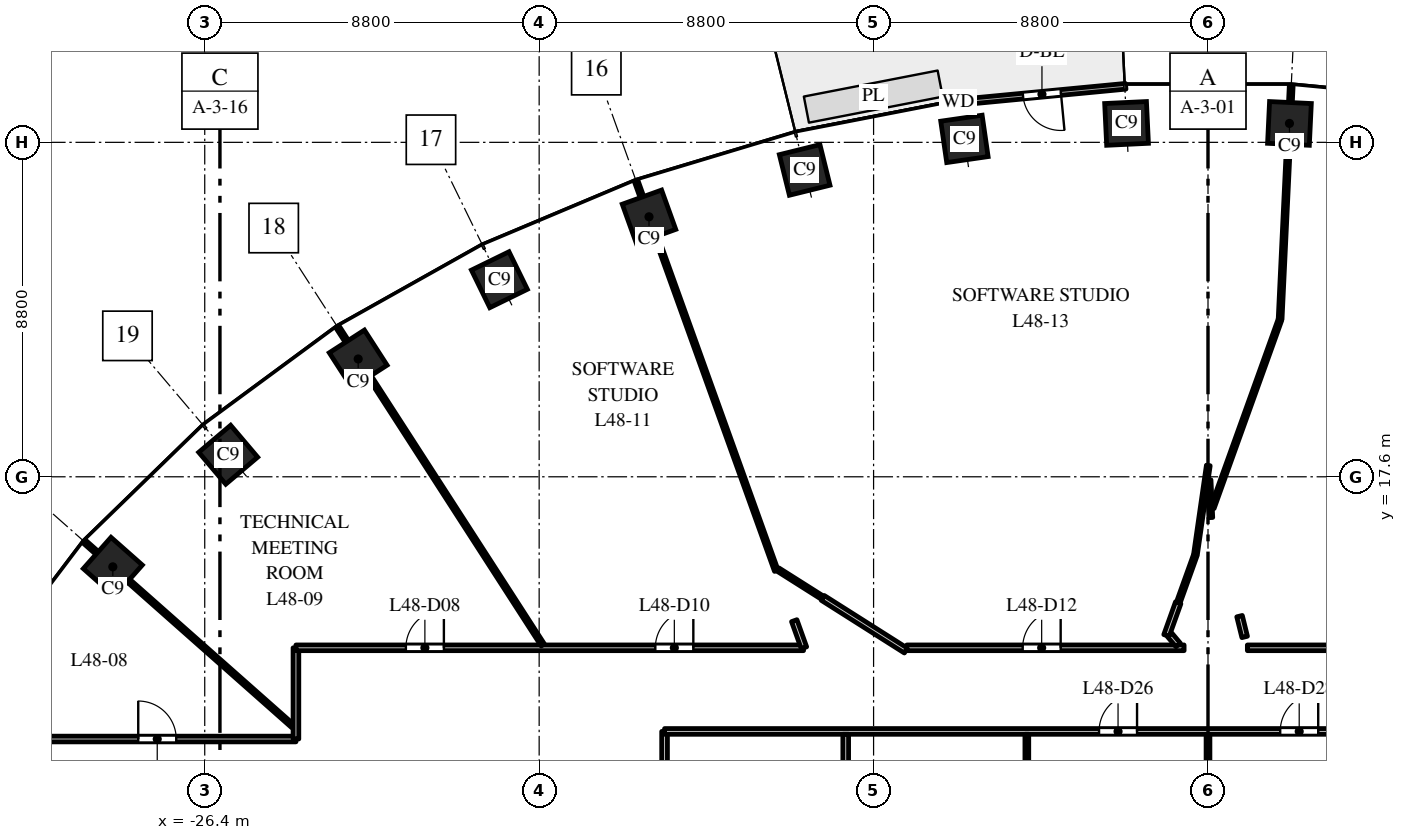
"""IFC4 building model, lengths in metres.
Left out: names, types, materials, properties, quantities, classifications, styles, units other than length and angle.
Written with IfcOpenShell. Run it as: python <this file> out.ifc"""

import sys

from ifc_helpers import new_model, si_unit, direction, frame, frame_2d, origin, origin_2d, place, context, subcontext, project, spatial, rectangle, extrude, element, fill, save


model = new_model("IFC4")
c1 = context("Model", 3, precision=1e-05, world=origin(), true_north=direction((0.0, 1.0)))
c2 = subcontext(c1, "Body", "Model", "MODEL_VIEW")
j1 = project(units=[si_unit("LENGTHUNIT", "METRE"), si_unit("PLANEANGLEUNIT", "RADIAN")], contexts=[c1])
p1 = place(None, origin())
s1 = spatial("IfcSite", under=j1, at=p1, CompositionType="ELEMENT")
p2 = place(p1, origin())
s2 = spatial("IfcBuilding", under=s1, at=p2, CompositionType="ELEMENT")
p3 = place(p2, frame((0.0, 0.0, 233.5)))
s3 = spatial("IfcBuildingStorey", under=s2, at=p3, CompositionType="ELEMENT", Elevation=233.5)
for number, where, z_axis, x_axis in (
    (1, (2.143, 26.898, 0.0), (0.0, 0.0, 1.0), (-0.999, 0.048, 0.0)),
    (2, (-2.143, 26.898, 0.0), (0.0, 0.0, 1.0), (-0.999, -0.048, 0.0)),
    (3, (-6.409, 26.491, 0.0), (0.0, 0.0, 1.0), (-0.99, -0.143, 0.0)),
    (4, (-10.613, 25.674, 0.0), (0.0, 0.0, 1.0), (-0.971, -0.24, 0.0)),
    (5, (-14.709, 24.441, 0.0), (0.0, 0.0, 1.0), (-0.941, -0.338, 0.0)),
    (6, (-18.646, 22.785, 0.0), (0.0, 0.0, 1.0), (-0.898, -0.439, 0.0)),
    (7, (-22.362, 20.7, 0.0), (0.0, 0.0, 1.0), (-0.84, -0.542, 0.0)),
    (8, (-25.783, 18.18, 0.0), (0.0, 0.0, 1.0), (-0.763, -0.646, 0.0)),
    (9, (-28.819, 15.23, 0.0), (0.0, 0.0, 1.0), (-0.663, -0.749, 0.0)),
):
    element("IfcColumn", number, at=place(p3, frame(where, z_axis=z_axis, x_axis=x_axis)), inside=s3, PredefinedType="COLUMN", context=c2, shape_type="SweptSolid", body=[
        extrude(rectangle(XDim=1.1, YDim=1.1, at=origin_2d()), origin(), (0.0, 0.0, 1.0), 4.0),
    ])
p4 = place(p3, frame((-2.166, 27.875, 0.0), z_axis=(0.0, 0.0, 1.0), x_axis=(-0.995473879823, -0.095035543824, 0.0)))
e10 = element("IfcWall", 10, at=p4, inside=s3, PredefinedType="STANDARD", context=c2, shape_type="SweptSolid", body=[
    extrude(rectangle(XDim=4.426, YDim=0.15, at=frame_2d((2.213, 0.0))), origin(), (0.0, 0.0, 1.0), 3.7),
])
p5 = place(p4, frame((1.713, 0.0, 0.0)))
e11 = element("IfcOpeningElement", 11, at=p5, cuts=e10, PredefinedType="OPENING", context=c2, shape_type="SweptSolid", body=[
    extrude(rectangle(XDim=1.0, YDim=2.4, at=frame_2d((0.5, 1.2))), frame((0.0, 0.085, 0.0), z_axis=(0.0, -1.0, 0.0), x_axis=(1.0, 0.0, 0.0)), (0.0, 0.0, 1.0), 0.17),
])
p6 = place(p3, frame((-31.5, 10.7, 0.0), z_axis=(0.0, 0.0, 1.0), x_axis=(1.0, 0.0, 0.0)))
e12 = element("IfcWall", 12, at=p6, inside=s3, PredefinedType="PARTITIONING", context=c2, shape_type="SweptSolid", body=[
    extrude(rectangle(XDim=7.5, YDim=0.15, at=frame_2d((3.75, 0.0))), origin(), (0.0, 0.0, 1.0), 3.1),
])
p7 = place(p6, frame((3.35, 0.0, 0.0)))
e13 = element("IfcOpeningElement", 13, at=p7, cuts=e12, PredefinedType="OPENING", context=c2, shape_type="SweptSolid", body=[
    extrude(rectangle(XDim=1.0, YDim=2.1, at=frame_2d((0.5, 1.05))), frame((0.0, 0.085, 0.0), z_axis=(0.0, -1.0, 0.0), x_axis=(1.0, 0.0, 0.0)), (0.0, 0.0, 1.0), 0.17),
])
p8 = place(p3, frame((-29.569, 15.895, 0.0), z_axis=(0.0, 0.0, 1.0), x_axis=(0.748936848479, -0.662641378869, 0.0)))
e14 = element("IfcWall", 14, at=p8, inside=s3, PredefinedType="PARTITIONING", context=c2, shape_type="SweptSolid", body=[
    extrude(rectangle(XDim=7.336, YDim=0.1, at=frame_2d((3.668, 0.0))), origin(), (0.0, 0.0, 1.0), 3.0),
])
p9 = place(p3, frame((-24.0, 10.7, 0.0), z_axis=(0.0, 0.0, 1.0), x_axis=(0.0, 1.0, 0.0)))
e15 = element("IfcWall", 15, at=p9, inside=s3, PredefinedType="PARTITIONING", context=c2, shape_type="SweptSolid", body=[
    extrude(rectangle(XDim=2.4, YDim=0.15, at=frame_2d((1.2, 0.0))), origin(), (0.0, 0.0, 1.0), 3.7),
])
p10 = place(p3, frame((-24.0, 13.1, 0.0), z_axis=(0.0, 0.0, 1.0), x_axis=(1.0, 0.0, 0.0)))
e16 = element("IfcWall", 16, at=p10, inside=s3, PredefinedType="PARTITIONING", context=c2, shape_type="SweptSolid", body=[
    extrude(rectangle(XDim=13.357, YDim=0.15, at=frame_2d((6.678, 0.0))), origin(), (0.0, 0.0, 1.0), 2.75),
])
p11 = place(p10, frame((2.893, 0.0, 0.0)))
e17 = element("IfcOpeningElement", 17, at=p11, cuts=e16, PredefinedType="OPENING", context=c2, shape_type="SweptSolid", body=[
    extrude(rectangle(XDim=1.0, YDim=2.1, at=frame_2d((0.5, 1.05))), frame((0.0, 0.085, 0.0), z_axis=(0.0, -1.0, 0.0), x_axis=(1.0, 0.0, 0.0)), (0.0, 0.0, 1.0), 0.17),
])
p12 = place(p10, frame((9.457, 0.0, 0.0)))
e18 = element("IfcOpeningElement", 18, at=p12, cuts=e16, PredefinedType="OPENING", context=c2, shape_type="SweptSolid", body=[
    extrude(rectangle(XDim=1.0, YDim=2.1, at=frame_2d((0.5, 1.05))), frame((0.0, 0.085, 0.0), z_axis=(0.0, -1.0, 0.0), x_axis=(1.0, 0.0, 0.0)), (0.0, 0.0, 1.0), 0.17),
])
p13 = place(p3, frame((-22.905, 21.542, 0.0), z_axis=(0.0, 0.0, 1.0), x_axis=(0.542277075573, -0.840199722273, 0.0)))
e19 = element("IfcWall", 19, at=p13, inside=s3, PredefinedType="PARTITIONING", context=c2, shape_type="SweptSolid", body=[
    extrude(rectangle(XDim=9.958, YDim=0.1, at=frame_2d((4.979, 0.0))), origin(), (0.0, 0.0, 1.0), 3.0),
])
p14 = place(p3, frame((-15.048, 25.383, 0.0), z_axis=(0.0, 0.0, 1.0), x_axis=(0.338406105684, -0.941000163462, 0.0)))
e20 = element("IfcWall", 20, at=p14, inside=s3, PredefinedType="PARTITIONING", context=c2, shape_type="SweptSolid", body=[
    extrude(rectangle(XDim=10.898, YDim=0.1, at=frame_2d((5.449, 0.0))), origin(), (0.0, 0.0, 1.0), 3.0),
])
p15 = place(p3, frame((-14.3, -10.9, 0.0), z_axis=(0.0, 0.0, 1.0), x_axis=(0.0, 1.0, 0.0)))
e21 = element("IfcWall", 21, at=p15, inside=s3, PredefinedType="PARTITIONING", context=c2, shape_type="SweptSolid", body=[
    extrude(rectangle(XDim=21.8, YDim=0.15, at=frame_2d((10.9, 0.0))), origin(), (0.0, 0.0, 1.0), 2.75),
])
p16 = place(p15, frame((10.4, 0.0, 0.0)))
e22 = element("IfcOpeningElement", 22, at=p16, cuts=e21, PredefinedType="OPENING", context=c2, shape_type="SweptSolid", body=[
    extrude(rectangle(XDim=1.0, YDim=2.1, at=frame_2d((0.5, 1.05))), frame((0.0, 0.085, 0.0), z_axis=(0.0, -1.0, 0.0), x_axis=(1.0, 0.0, 0.0)), (0.0, 0.0, 1.0), 0.17),
])
p17 = place(p3, frame((-14.3, 10.9, 0.0), z_axis=(0.0, 0.0, 1.0), x_axis=(1.0, 0.0, 0.0)))
e23 = element("IfcWall", 23, at=p17, inside=s3, PredefinedType="PARTITIONING", context=c2, shape_type="SweptSolid", body=[
    extrude(rectangle(XDim=28.6, YDim=0.15, at=frame_2d((14.3, 0.0))), origin(), (0.0, 0.0, 1.0), 2.85),
])
p18 = place(p17, frame((11.433, 0.0, 0.0)))
e24 = element("IfcOpeningElement", 24, at=p18, cuts=e23, PredefinedType="OPENING", context=c2, shape_type="SweptSolid", body=[
    extrude(rectangle(XDim=1.0, YDim=2.1, at=frame_2d((0.5, 1.05))), frame((0.0, 0.085, 0.0), z_axis=(0.0, -1.0, 0.0), x_axis=(1.0, 0.0, 0.0)), (0.0, 0.0, 1.0), 0.17),
])
p19 = place(p17, frame((16.2, 0.0, 0.0)))
e25 = element("IfcOpeningElement", 25, at=p19, cuts=e23, PredefinedType="OPENING", context=c2, shape_type="SweptSolid", body=[
    extrude(rectangle(XDim=1.0, YDim=2.1, at=frame_2d((0.5, 1.05))), frame((0.0, 0.085, 0.0), z_axis=(0.0, -1.0, 0.0), x_axis=(1.0, 0.0, 0.0)), (0.0, 0.0, 1.0), 0.17),
])
p20 = place(p17, frame((20.967, 0.0, 0.0)))
e26 = element("IfcOpeningElement", 26, at=p20, cuts=e23, PredefinedType="OPENING", context=c2, shape_type="SweptSolid", body=[
    extrude(rectangle(XDim=1.0, YDim=2.1, at=frame_2d((0.5, 1.05))), frame((0.0, 0.085, 0.0), z_axis=(0.0, -1.0, 0.0), x_axis=(1.0, 0.0, 0.0)), (0.0, 0.0, 1.0), 0.17),
])
p21 = place(p3, frame((-11.319, 15.161, 0.0), z_axis=(0.0, 0.0, 1.0), x_axis=(0.845102975348, -0.534603555037, 0.0)))
e27 = element("IfcWall", 27, at=p21, inside=s3, PredefinedType="PARTITIONING", context=c2, shape_type="SweptSolid", body=[
    extrude(rectangle(XDim=1.399, YDim=0.1, at=frame_2d((0.699, 0.0))), origin(), (0.0, 0.0, 1.0), 3.7),
])
p22 = place(p3, frame((-10.888, 13.814, 0.0), z_axis=(0.0, 0.0, 1.0), x_axis=(0.337396703232, -0.941362557492, 0.0)))
e28 = element("IfcWall", 28, at=p22, inside=s3, PredefinedType="PARTITIONING", context=c2, shape_type="SweptSolid", body=[
    extrude(rectangle(XDim=0.758, YDim=0.15, at=frame_2d((0.379, 0.0))), origin(), (0.0, 0.0, 1.0), 2.85),
])
p23 = place(p3, frame((-10.137, 14.413, 0.0), z_axis=(0.0, 0.0, 1.0), x_axis=(0.844665601723, -0.535294331434, 0.0)))
e29 = element("IfcWall", 29, at=p23, inside=s3, PredefinedType="PARTITIONING", context=c2, shape_type="SweptSolid", body=[
    extrude(rectangle(XDim=2.589, YDim=0.15, at=frame_2d((1.294, 0.0))), origin(), (0.0, 0.0, 1.0), 3.7),
])
p24 = place(p3, frame((-9.533, -10.825, 0.0), z_axis=(0.0, 0.0, 1.0), x_axis=(0.0, 1.0, 0.0)))
e30 = element("IfcWall", 30, at=p24, inside=s3, PredefinedType="PARTITIONING", context=c2, shape_type="SweptSolid", body=[
    extrude(rectangle(XDim=21.65, YDim=0.15, at=frame_2d((10.825, 0.0))), origin(), (0.0, 0.0, 1.0), 2.75),
])
p25 = place(p24, frame((15.575, 0.0, 0.0)))
e31 = element("IfcOpeningElement", 31, at=p25, cuts=e30, PredefinedType="OPENING", context=c2, shape_type="SweptSolid", body=[
    extrude(rectangle(XDim=1.0, YDim=2.1, at=frame_2d((0.5, 1.05))), frame((0.0, 0.085, 0.0), z_axis=(0.0, -1.0, 0.0), x_axis=(1.0, 0.0, 0.0)), (0.0, 0.0, 1.0), 0.17),
])
p26 = place(p3, frame((-7.925, 13.1, 0.0), z_axis=(0.0, 0.0, 1.0), x_axis=(1.0, 0.0, 0.0)))
e32 = element("IfcWall", 32, at=p26, inside=s3, PredefinedType="PARTITIONING", context=c2, shape_type="SweptSolid", body=[
    extrude(rectangle(XDim=7.296, YDim=0.15, at=frame_2d((3.648, 0.0))), origin(), (0.0, 0.0, 1.0), 2.85),
])
p27 = place(p26, frame((3.048, 0.0, 0.0)))
e33 = element("IfcOpeningElement", 33, at=p27, cuts=e32, PredefinedType="OPENING", context=c2, shape_type="SweptSolid", body=[
    extrude(rectangle(XDim=1.0, YDim=2.1, at=frame_2d((0.5, 1.05))), frame((0.0, 0.085, 0.0), z_axis=(0.0, -1.0, 0.0), x_axis=(1.0, 0.0, 0.0)), (0.0, 0.0, 1.0), 0.17),
])
p28 = place(p3, frame((-4.767, 6.363, 0.0), z_axis=(0.0, 0.0, 1.0), x_axis=(0.0, 1.0, 0.0)))
e34 = element("IfcWall", 34, at=p28, inside=s3, PredefinedType="PARTITIONING", context=c2, shape_type="SweptSolid", body=[
    extrude(rectangle(XDim=4.462, YDim=0.1, at=frame_2d((2.231, 0.0))), origin(), (0.0, 0.0, 1.0), 3.0),
])
p29 = place(p3, frame((-1.093, 13.423, 0.0), z_axis=(0.0, 0.0, 1.0), x_axis=(0.337586124745, 0.941294644827, 0.0)))
e35 = element("IfcWall", 35, at=p29, inside=s3, PredefinedType="PARTITIONING", context=c2, shape_type="SweptSolid", body=[
    extrude(rectangle(XDim=0.916, YDim=0.15, at=frame_2d((0.458, 0.0))), origin(), (0.0, 0.0, 1.0), 2.85),
])
p30 = place(p3, frame((-1.008, 13.439, 0.0), z_axis=(0.0, 0.0, 1.0), x_axis=(0.645657197235, -0.763627385351, 0.0)))
e36 = element("IfcWall", 36, at=p30, inside=s3, PredefinedType="PARTITIONING", context=c2, shape_type="SweptSolid", body=[
    extrude(rectangle(XDim=0.346, YDim=0.15, at=frame_2d((0.173, 0.0))), origin(), (0.0, 0.0, 1.0), 2.85),
])
p31 = place(p3, frame((-0.781, 14.294, 0.0), z_axis=(0.0, 0.0, 1.0), x_axis=(0.338162451205, 0.941087751804, 0.0)))
e37 = element("IfcWall", 37, at=p31, inside=s3, PredefinedType="PARTITIONING", context=c2, shape_type="SweptSolid", body=[
    extrude(rectangle(XDim=1.304, YDim=0.1, at=frame_2d((0.652, 0.0))), origin(), (0.0, 0.0, 1.0), 3.7),
])
p32 = place(p3, frame((-0.332, 15.539, 0.0), z_axis=(0.0, 0.0, 1.0), x_axis=(0.142697629543, 0.989766329253, 0.0)))
e38 = element("IfcWall", 38, at=p32, inside=s3, PredefinedType="PARTITIONING", context=c2, shape_type="SweptSolid", body=[
    extrude(rectangle(XDim=2.383, YDim=0.1, at=frame_2d((1.192, 0.0))), origin(), (0.0, 0.0, 1.0), 3.7),
])
p33 = place(p3, frame((0.0, 7.504, 0.0), z_axis=(0.0, 0.0, 1.0), x_axis=(0.0, 1.0, 0.0)))
e39 = element("IfcWall", 39, at=p33, inside=s3, PredefinedType="PARTITIONING", context=c2, shape_type="SweptSolid", body=[
    extrude(rectangle(XDim=3.321, YDim=0.1, at=frame_2d((1.661, 0.0))), origin(), (0.0, 0.0, 1.0), 3.7),
])
p34 = place(p3, frame((0.028, 17.518, 0.0), z_axis=(0.0, 0.0, 1.0), x_axis=(0.046267226044, -0.998929098482, 0.0)))
e40 = element("IfcWall", 40, at=p34, inside=s3, PredefinedType="PARTITIONING", context=c2, shape_type="SweptSolid", body=[
    extrude(rectangle(XDim=0.992, YDim=0.1, at=frame_2d((0.496, 0.0))), origin(), (0.0, 0.0, 1.0), 3.7),
])
p35 = place(p3, frame((0.113, 16.781, 0.0), z_axis=(0.0, 0.0, 1.0), x_axis=(0.338409154086, 0.940999067178, 0.0)))
e41 = element("IfcWall", 41, at=p35, inside=s3, PredefinedType="PARTITIONING", context=c2, shape_type="SweptSolid", body=[
    extrude(rectangle(XDim=5.266, YDim=0.1, at=frame_2d((2.633, 0.0))), origin(), (0.0, 0.0, 1.0), 3.7),
])
p36 = place(p3, frame((0.83, 13.933, 0.0), z_axis=(0.0, 0.0, 1.0), x_axis=(0.239578315167, -0.970877042113, 0.0)))
e42 = element("IfcWall", 42, at=p36, inside=s3, PredefinedType="PARTITIONING", context=c2, shape_type="SweptSolid", body=[
    extrude(rectangle(XDim=0.563, YDim=0.15, at=frame_2d((0.282, 0.0))), origin(), (0.0, 0.0, 1.0), 3.7),
])
p37 = place(p3, frame((1.036, 13.1, 0.0), z_axis=(0.0, 0.0, 1.0), x_axis=(1.0, 0.0, 0.0)))
e43 = element("IfcWall", 43, at=p37, inside=s3, PredefinedType="PARTITIONING", context=c2, shape_type="SweptSolid", body=[
    extrude(rectangle(XDim=6.471, YDim=0.15, at=frame_2d((3.236, 0.0))), origin(), (0.0, 0.0, 1.0), 2.85),
])
p38 = place(p37, frame((2.838, 0.0, 0.0)))
e44 = element("IfcOpeningElement", 44, at=p38, cuts=e43, PredefinedType="OPENING", context=c2, shape_type="SweptSolid", body=[
    extrude(rectangle(XDim=1.0, YDim=2.1, at=frame_2d((0.5, 1.05))), frame((0.0, 0.085, 0.0), z_axis=(0.0, -1.0, 0.0), x_axis=(1.0, 0.0, 0.0)), (0.0, 0.0, 1.0), 0.17),
])
p39 = place(p3, frame((1.898, 21.75, 0.0), z_axis=(0.0, 0.0, 1.0), x_axis=(0.047440765919, 0.998874052986, 0.0)))
e45 = element("IfcWall", 45, at=p39, inside=s3, PredefinedType="PARTITIONING", context=c2, shape_type="SweptSolid", body=[
    extrude(rectangle(XDim=6.155, YDim=0.1, at=frame_2d((3.077, 0.0))), origin(), (0.0, 0.0, 1.0), 3.0),
])
p40 = place(p5, origin())
e46 = element("IfcDoor", 46, at=p40, inside=s3, OperationType="SINGLE_SWING_LEFT", PredefinedType="DOOR", context=c2, shape_type="SweptSolid", body=[
    extrude(rectangle(XDim=1.0, YDim=2.4, at=frame_2d((0.5, 1.2))), frame((0.0, 0.025, 0.0), z_axis=(0.0, -1.0, 0.0), x_axis=(1.0, 0.0, 0.0)), (0.0, 0.0, 1.0), 0.05),
])
fill(e11, e46)
p41 = place(p7, origin())
e47 = element("IfcDoor", 47, at=p41, inside=s3, OperationType="SINGLE_SWING_LEFT", PredefinedType="DOOR", context=c2, shape_type="SweptSolid", body=[
    extrude(rectangle(XDim=1.0, YDim=2.1, at=frame_2d((0.5, 1.05))), frame((0.0, 0.025, 0.0), z_axis=(0.0, -1.0, 0.0), x_axis=(1.0, 0.0, 0.0)), (0.0, 0.0, 1.0), 0.05),
])
fill(e13, e47)
p42 = place(p11, origin())
e48 = element("IfcDoor", 48, at=p42, inside=s3, OperationType="SINGLE_SWING_RIGHT", PredefinedType="DOOR", context=c2, shape_type="SweptSolid", body=[
    extrude(rectangle(XDim=1.0, YDim=2.1, at=frame_2d((0.5, 1.05))), frame((0.0, 0.025, 0.0), z_axis=(0.0, -1.0, 0.0), x_axis=(1.0, 0.0, 0.0)), (0.0, 0.0, 1.0), 0.05),
])
fill(e17, e48)
p43 = place(p12, origin())
e49 = element("IfcDoor", 49, at=p43, inside=s3, OperationType="SINGLE_SWING_RIGHT", PredefinedType="DOOR", context=c2, shape_type="SweptSolid", body=[
    extrude(rectangle(XDim=1.0, YDim=2.1, at=frame_2d((0.5, 1.05))), frame((0.0, 0.025, 0.0), z_axis=(0.0, -1.0, 0.0), x_axis=(1.0, 0.0, 0.0)), (0.0, 0.0, 1.0), 0.05),
])
fill(e18, e49)
p44 = place(p27, origin())
e50 = element("IfcDoor", 50, at=p44, inside=s3, OperationType="SINGLE_SWING_RIGHT", PredefinedType="DOOR", context=c2, shape_type="SweptSolid", body=[
    extrude(rectangle(XDim=1.0, YDim=2.1, at=frame_2d((0.5, 1.05))), frame((0.0, 0.025, 0.0), z_axis=(0.0, -1.0, 0.0), x_axis=(1.0, 0.0, 0.0)), (0.0, 0.0, 1.0), 0.05),
])
fill(e33, e50)
p45 = place(p18, origin())
e51 = element("IfcDoor", 51, at=p45, inside=s3, OperationType="SINGLE_SWING_RIGHT", PredefinedType="DOOR", context=c2, shape_type="SweptSolid", body=[
    extrude(rectangle(XDim=1.0, YDim=2.1, at=frame_2d((0.5, 1.05))), frame((0.0, 0.025, 0.0), z_axis=(0.0, -1.0, 0.0), x_axis=(1.0, 0.0, 0.0)), (0.0, 0.0, 1.0), 0.05),
])
fill(e24, e51)
p46 = place(p19, origin())
e52 = element("IfcDoor", 52, at=p46, inside=s3, OperationType="SINGLE_SWING_RIGHT", PredefinedType="DOOR", context=c2, shape_type="SweptSolid", body=[
    extrude(rectangle(XDim=1.0, YDim=2.1, at=frame_2d((0.5, 1.05))), frame((0.0, 0.025, 0.0), z_axis=(0.0, -1.0, 0.0), x_axis=(1.0, 0.0, 0.0)), (0.0, 0.0, 1.0), 0.05),
])
fill(e25, e52)
save(model, sys.argv[1])
